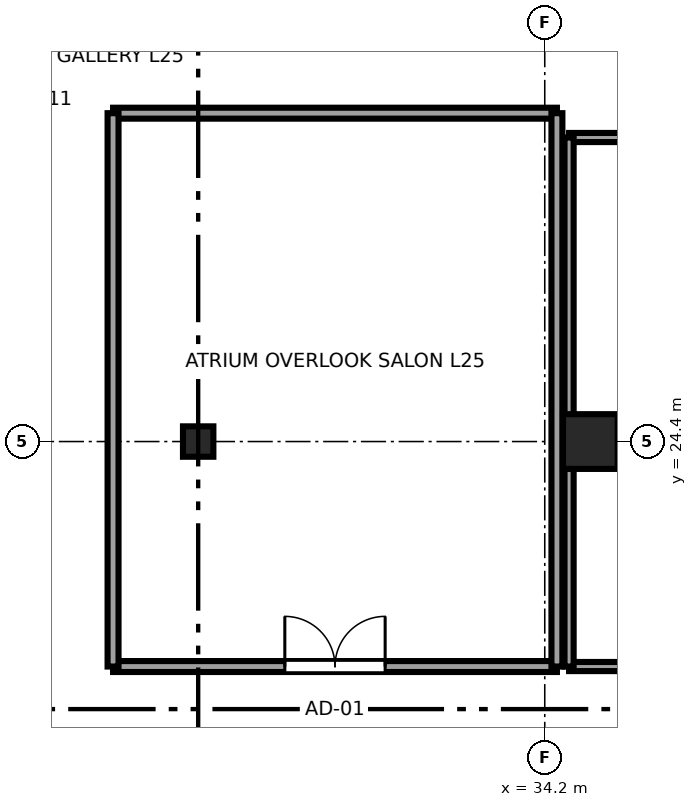
"""IFC4 building model, lengths in metres.
Left out: names, types, materials, properties, quantities, classifications, styles, units other than length and angle.
Written with IfcOpenShell. Run it as: python <this file> out.ifc"""

import sys

from ifc_helpers import new_model, si_unit, direction, frame, frame_2d, origin, origin_2d, place, context, subcontext, project, spatial, rectangle, i_section, extrude, source, transform, mapped, element, fill, save


model = new_model("IFC4")
c1 = context("Model", 3, precision=1e-05, world=origin(), true_north=direction((0.0, 1.0)))
c2 = subcontext(c1, "Body", "Model", "MODEL_VIEW")
j1 = project(units=[si_unit("LENGTHUNIT", "METRE"), si_unit("PLANEANGLEUNIT", "RADIAN")], contexts=[c1])
p1 = place(None, origin())
s1 = spatial("IfcSite", under=j1, at=p1, CompositionType="ELEMENT")
p2 = place(p1, origin())
s2 = spatial("IfcBuilding", under=s1, at=p2, CompositionType="ELEMENT")
p3 = place(p2, frame((0.0, 0.0, 100.9)))
s3 = spatial("IfcBuildingStorey", under=s2, at=p3, CompositionType="ELEMENT", Elevation=100.9)
m1 = source(origin(), c2, "Body", "SweptSolid", [
    extrude(rectangle(XDim=0.9, YDim=0.9, at=origin_2d()), origin(), (0.0, 0.0, 1.0), 3.55),
])
p4 = place(p3, frame((34.95, 24.4, 0.0), z_axis=(0.0, 0.0, 1.0), x_axis=(1.0, 0.0, 0.0)))
e1 = element("IfcColumn", 1, at=p4, inside=s3, PredefinedType="COLUMN", context=c2, shape_type="MappedRepresentation", body=[
    mapped(m1, transform((0.0, 0.0, 0.0), x_axis=(1.0, 0.0, 0.0), y_axis=(0.0, 1.0, 0.0), z_axis=(0.0, 0.0, 1.0), scale=1.0)),
])
m2 = source(origin(), c2, "Body", "SweptSolid", [
    extrude(i_section(OverallWidth=0.5, OverallDepth=0.5, WebThickness=0.022, FlangeThickness=0.034, at=origin_2d()), origin(), (0.0, 0.0, 1.0), 3.55),
])
p5 = place(p3, frame((28.5, 24.4, 0.0), z_axis=(0.0, 0.0, 1.0), x_axis=(1.0, 0.0, 0.0)))
e2 = element("IfcColumn", 2, at=p5, inside=s3, PredefinedType="COLUMN", context=c2, shape_type="MappedRepresentation", body=[
    mapped(m2, transform((0.0, 0.0, 0.0), x_axis=(1.0, 0.0, 0.0), y_axis=(0.0, 1.0, 0.0), z_axis=(0.0, 0.0, 1.0), scale=1.0)),
])
p6 = place(p3, frame((27.1, 20.7, 0.0), z_axis=(0.0, 0.0, 1.0), x_axis=(1.0, 0.0, 0.0)))
e3 = element("IfcWall", 3, at=p6, inside=s3, PredefinedType="PARTITIONING", context=c2, shape_type="SweptSolid", body=[
    extrude(rectangle(XDim=7.3, YDim=0.18, at=frame_2d((3.65, 0.0))), origin(), (0.0, 0.0, 1.0), 3.37),
])
p7 = place(p6, frame((2.825, 0.0, 0.0)))
e4 = element("IfcOpeningElement", 4, at=p7, cuts=e3, PredefinedType="OPENING", context=c2, shape_type="SweptSolid", body=[
    extrude(rectangle(XDim=1.65, YDim=2.15, at=frame_2d((0.825, 1.075))), frame((0.0, 0.1, 0.0), z_axis=(0.0, -1.0, 0.0), x_axis=(1.0, 0.0, 0.0)), (0.0, 0.0, 1.0), 0.2),
])
p8 = place(p3, frame((27.1, 29.8, 0.0), z_axis=(0.0, 0.0, 1.0), x_axis=(1.0, 0.0, 0.0)))
e5 = element("IfcWall", 5, at=p8, inside=s3, PredefinedType="PARTITIONING", context=c2, shape_type="SweptSolid", body=[
    extrude(rectangle(XDim=7.3, YDim=0.18, at=frame_2d((3.65, 0.0))), origin(), (0.0, 0.0, 1.0), 3.37),
])
for number, where, z_axis, x_axis in (
    (6, (27.1, 20.7, 0.0), (0.0, 0.0, 1.0), (0.0, 1.0, 0.0)),
    (7, (34.4, 20.7, 0.0), (0.0, 0.0, 1.0), (0.0, 1.0, 0.0)),
):
    element("IfcWall", number, at=place(p3, frame(where, z_axis=z_axis, x_axis=x_axis)), inside=s3, PredefinedType="PARTITIONING", context=c2, shape_type="SweptSolid", body=[
        extrude(rectangle(XDim=9.1, YDim=0.18, at=frame_2d((4.55, 0.0))), origin(), (0.0, 0.0, 1.0), 3.37),
    ])
p9 = place(p3, frame((34.6, 20.7, 0.0), z_axis=(0.0, 0.0, 1.0), x_axis=(1.0, 0.0, 0.0)))
e8 = element("IfcWall", 8, at=p9, inside=s3, PredefinedType="PARTITIONING", context=c2, shape_type="SweptSolid", body=[
    extrude(rectangle(XDim=7.5, YDim=0.15, at=frame_2d((3.75, 0.0))), origin(), (0.0, 0.0, 1.0), 3.37),
])
p10 = place(p9, frame((2.925, 0.0, 0.0)))
e9 = element("IfcOpeningElement", 9, at=p10, cuts=e8, PredefinedType="OPENING", context=c2, shape_type="SweptSolid", body=[
    extrude(rectangle(XDim=1.65, YDim=2.15, at=frame_2d((0.825, 1.075))), frame((0.0, 0.085, 0.0), z_axis=(0.0, -1.0, 0.0), x_axis=(1.0, 0.0, 0.0)), (0.0, 0.0, 1.0), 0.17),
])
p11 = place(p3, frame((34.6, 29.4, 0.0), z_axis=(0.0, 0.0, 1.0), x_axis=(1.0, 0.0, 0.0)))
e10 = element("IfcWall", 10, at=p11, inside=s3, PredefinedType="PARTITIONING", context=c2, shape_type="SweptSolid", body=[
    extrude(rectangle(XDim=7.5, YDim=0.15, at=frame_2d((3.75, 0.0))), origin(), (0.0, 0.0, 1.0), 3.37),
])
p12 = place(p3, frame((34.6, 20.7, 0.0), z_axis=(0.0, 0.0, 1.0), x_axis=(0.0, 1.0, 0.0)))
e11 = element("IfcWall", 11, at=p12, inside=s3, PredefinedType="PARTITIONING", context=c2, shape_type="SweptSolid", body=[
    extrude(rectangle(XDim=8.7, YDim=0.15, at=frame_2d((4.35, 0.0))), origin(), (0.0, 0.0, 1.0), 3.37),
])
m3 = source(origin(), c2, "Body", "SweptSolid", [
    extrude(rectangle(XDim=1.65, YDim=2.15, at=frame_2d((0.825, 1.075))), frame((0.0, 0.025, 0.0), z_axis=(0.0, -1.0, 0.0), x_axis=(1.0, 0.0, 0.0)), (0.0, 0.0, 1.0), 0.05),
])
p13 = place(p7, origin())
e12 = element("IfcDoor", 12, at=p13, inside=s3, OperationType="DOUBLE_DOOR_SINGLE_SWING", PredefinedType="DOOR", context=c2, shape_type="MappedRepresentation", body=[
    mapped(m3, transform((0.0, 0.0, 0.0), x_axis=(1.0, 0.0, 0.0), y_axis=(0.0, 1.0, 0.0), z_axis=(0.0, 0.0, 1.0), scale=1.0)),
])
fill(e4, e12)
save(model, sys.argv[1])
